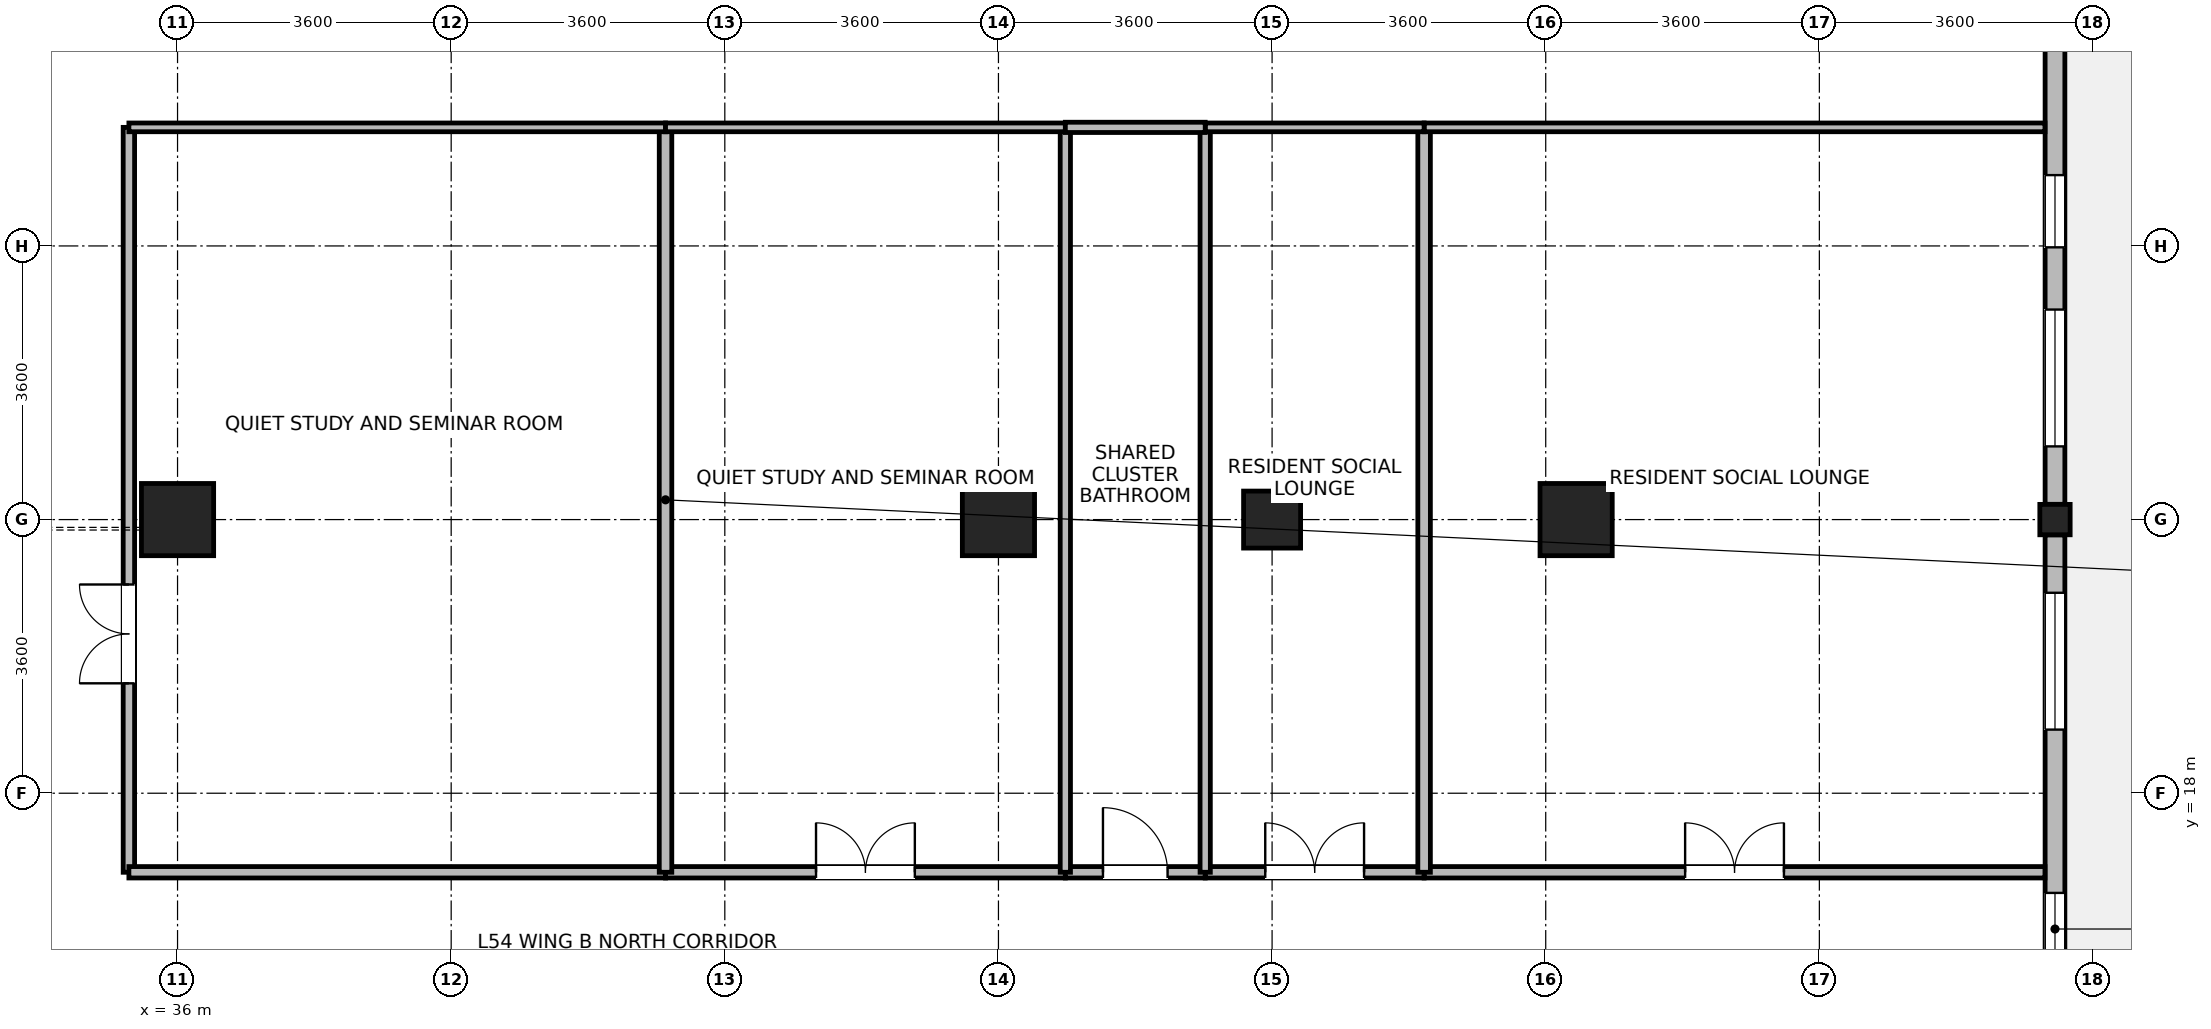
"""IFC4 building model, lengths in metres.
Left out: names, types, materials, properties, quantities, classifications, styles, units other than length and angle.
Written with IfcOpenShell. Run it as: python <this file> out.ifc"""

import sys

from ifc_helpers import new_model, si_unit, direction, frame, frame_2d, origin, origin_2d, place, context, subcontext, project, spatial, rectangle, i_section, extrude, source, transform, mapped, element, fill, save


model = new_model("IFC4")
c1 = context("Model", 3, precision=1e-05, world=origin(), true_north=direction((0.0, 1.0)))
c2 = subcontext(c1, "Body", "Model", "MODEL_VIEW")
j1 = project(units=[si_unit("LENGTHUNIT", "METRE"), si_unit("PLANEANGLEUNIT", "RADIAN")], contexts=[c1])
p1 = place(None, origin())
s1 = spatial("IfcSite", under=j1, at=p1, CompositionType="ELEMENT")
p2 = place(p1, origin())
s2 = spatial("IfcBuilding", under=s1, at=p2, CompositionType="ELEMENT")
p3 = place(p2, frame((0.0, 0.0, 212.9)))
s3 = spatial("IfcBuildingStorey", under=s2, at=p3, CompositionType="ELEMENT", Elevation=212.9)
m1 = source(origin(), c2, "Body", "SweptSolid", [
    extrude(rectangle(XDim=0.95, YDim=0.95, at=origin_2d()), origin(), (0.0, 0.0, 1.0), 3.7),
])
for number, where, z_axis, x_axis in (
    (1, (36.0, 21.6, 0.0), (0.0, 0.0, 1.0), (1.0, 0.0, 0.0)),
    (2, (46.8, 21.6, 0.0), (0.0, 0.0, 1.0), (1.0, 0.0, 0.0)),
):
    element("IfcColumn", number, at=place(p3, frame(where, z_axis=z_axis, x_axis=x_axis)), inside=s3, PredefinedType="COLUMN", context=c2, shape_type="MappedRepresentation", body=[
        mapped(m1, transform((0.0, 0.0, 0.0), x_axis=(1.0, 0.0, 0.0), y_axis=(0.0, 1.0, 0.0), z_axis=(0.0, 0.0, 1.0), scale=1.0)),
    ])
m2 = source(origin(), c2, "Body", "SweptSolid", [
    extrude(rectangle(XDim=0.75, YDim=0.75, at=origin_2d()), origin(), (0.0, 0.0, 1.0), 3.7),
])
p4 = place(p3, frame((50.4, 21.6, 0.0), z_axis=(0.0, 0.0, 1.0), x_axis=(1.0, 0.0, 0.0)))
e3 = element("IfcColumn", 3, at=p4, inside=s3, PredefinedType="PILASTER", context=c2, shape_type="MappedRepresentation", body=[
    mapped(m2, transform((0.0, 0.0, 0.0), x_axis=(1.0, 0.0, 0.0), y_axis=(0.0, 1.0, 0.0), z_axis=(0.0, 0.0, 1.0), scale=1.0)),
])
p5 = place(p3, frame((54.4, 21.6, 0.0), z_axis=(0.0, 0.0, 1.0), x_axis=(1.0, 0.0, 0.0)))
e4 = element("IfcColumn", 4, at=p5, inside=s3, PredefinedType="COLUMN", context=c2, shape_type="MappedRepresentation", body=[
    mapped(m1, transform((0.0, 0.0, 0.0), x_axis=(1.0, 0.0, 0.0), y_axis=(0.0, 1.0, 0.0), z_axis=(0.0, 0.0, 1.0), scale=1.0)),
])
m3 = source(origin(), c2, "Body", "SweptSolid", [
    extrude(i_section(OverallWidth=0.399, OverallDepth=0.4, WebThickness=0.017, FlangeThickness=0.023, FilletRadius=0.015, at=origin_2d()), origin(), (0.0, 0.0, 1.0), 3.7),
])
p6 = place(p3, frame((60.7, 21.6, 0.0), z_axis=(0.0, 0.0, 1.0), x_axis=(1.0, 0.0, 0.0)))
e5 = element("IfcColumn", 5, at=p6, inside=s3, PredefinedType="COLUMN", context=c2, shape_type="MappedRepresentation", body=[
    mapped(m3, transform((0.0, 0.0, 0.0), x_axis=(1.0, 0.0, 0.0), y_axis=(0.0, 1.0, 0.0), z_axis=(0.0, 0.0, 1.0), scale=1.0)),
])
p7 = place(p3, frame((60.7, 21.399, 0.0), z_axis=(0.0, 0.0, 1.0), x_axis=(0.0, -1.0, 0.0)))
e6 = element("IfcWall", 6, at=p7, inside=s3, PredefinedType="STANDARD", context=c2, shape_type="SweptSolid", body=[
    extrude(rectangle(XDim=6.648, YDim=0.26, at=frame_2d((3.324, 0.0))), origin(), (0.0, 0.0, 1.0), 3.05),
])
p8 = place(p7, frame((0.762, 0.0, 0.85)))
e7 = element("IfcOpeningElement", 7, at=p8, cuts=e6, PredefinedType="OPENING", context=c2, shape_type="SweptSolid", body=[
    extrude(rectangle(XDim=1.8, YDim=1.85, at=frame_2d((0.9, 0.925))), frame((0.0, 0.14, 0.0), z_axis=(0.0, -1.0, 0.0), x_axis=(1.0, 0.0, 0.0)), (0.0, 0.0, 1.0), 0.28),
])
p9 = place(p7, frame((4.71, 0.0, 0.85)))
e8 = element("IfcOpeningElement", 8, at=p9, cuts=e6, PredefinedType="OPENING", context=c2, shape_type="SweptSolid", body=[
    extrude(rectangle(XDim=0.95, YDim=1.75, at=frame_2d((0.475, 0.875))), frame((0.0, 0.14, 0.0), z_axis=(0.0, -1.0, 0.0), x_axis=(1.0, 0.0, 0.0)), (0.0, 0.0, 1.0), 0.28),
])
p10 = place(p3, frame((60.7, 28.449, 0.0), z_axis=(0.0, 0.0, 1.0), x_axis=(0.0, -1.0, 0.0)))
e9 = element("IfcWall", 9, at=p10, inside=s3, PredefinedType="STANDARD", context=c2, shape_type="SweptSolid", body=[
    extrude(rectangle(XDim=6.648, YDim=0.26, at=frame_2d((3.324, 0.0))), origin(), (0.0, 0.0, 1.0), 3.05),
])
p11 = place(p10, frame((4.086, 0.0, 0.85)))
e10 = element("IfcOpeningElement", 10, at=p11, cuts=e9, PredefinedType="OPENING", context=c2, shape_type="SweptSolid", body=[
    extrude(rectangle(XDim=1.8, YDim=1.85, at=frame_2d((0.9, 0.925))), frame((0.0, 0.14, 0.0), z_axis=(0.0, -1.0, 0.0), x_axis=(1.0, 0.0, 0.0)), (0.0, 0.0, 1.0), 0.28),
])
p12 = place(p10, frame((2.317, 0.0, 0.85)))
e11 = element("IfcOpeningElement", 11, at=p12, cuts=e9, PredefinedType="OPENING", context=c2, shape_type="SweptSolid", body=[
    extrude(rectangle(XDim=0.95, YDim=1.75, at=frame_2d((0.475, 0.875))), frame((0.0, 0.14, 0.0), z_axis=(0.0, -1.0, 0.0), x_axis=(1.0, 0.0, 0.0)), (0.0, 0.0, 1.0), 0.28),
])
p13 = place(p3, frame((35.36, 16.96, 0.0), z_axis=(0.0, 0.0, 1.0), x_axis=(0.0, 1.0, 0.0)))
e12 = element("IfcWall", 12, at=p13, inside=s3, PredefinedType="PARTITIONING", context=c2, shape_type="SweptSolid", body=[
    extrude(rectangle(XDim=9.8, YDim=0.15, at=frame_2d((4.9, 0.0))), origin(), (0.0, 0.0, 1.0), 3.45),
])
p14 = place(p13, frame((2.486, 0.0, 0.0)))
e13 = element("IfcOpeningElement", 13, at=p14, cuts=e12, PredefinedType="OPENING", context=c2, shape_type="SweptSolid", body=[
    extrude(rectangle(XDim=1.3, YDim=2.12, at=frame_2d((0.65, 1.06))), frame((0.0, 0.085, 0.0), z_axis=(0.0, -1.0, 0.0), x_axis=(1.0, 0.0, 0.0)), (0.0, 0.0, 1.0), 0.17),
])
p15 = place(p3, frame((52.4, 16.96, 0.0), z_axis=(0.0, 0.0, 1.0), x_axis=(1.0, 0.0, 0.0)))
e14 = element("IfcWall", 14, at=p15, inside=s3, PredefinedType="PARTITIONING", context=c2, shape_type="SweptSolid", body=[
    extrude(rectangle(XDim=8.168, YDim=0.15, at=frame_2d((4.084, 0.0))), origin(), (0.0, 0.0, 1.0), 3.45),
])
p16 = place(p15, frame((3.434, 0.0, 0.0)))
e15 = element("IfcOpeningElement", 15, at=p16, cuts=e14, PredefinedType="OPENING", context=c2, shape_type="SweptSolid", body=[
    extrude(rectangle(XDim=1.3, YDim=2.12, at=frame_2d((0.65, 1.06))), frame((0.0, 0.085, 0.0), z_axis=(0.0, -1.0, 0.0), x_axis=(1.0, 0.0, 0.0)), (0.0, 0.0, 1.0), 0.17),
])
p17 = place(p3, frame((35.36, 16.96, 0.0), z_axis=(0.0, 0.0, 1.0), x_axis=(1.0, 0.0, 0.0)))
e16 = element("IfcWall", 16, at=p17, inside=s3, PredefinedType="PARTITIONING", context=c2, shape_type="SweptSolid", body=[
    extrude(rectangle(XDim=7.06, YDim=0.15, at=frame_2d((3.53, 0.0))), origin(), (0.0, 0.0, 1.0), 3.45),
])
p18 = place(p3, frame((42.42, 16.96, 0.0), z_axis=(0.0, 0.0, 1.0), x_axis=(1.0, 0.0, 0.0)))
e17 = element("IfcWall", 17, at=p18, inside=s3, PredefinedType="PARTITIONING", context=c2, shape_type="SweptSolid", body=[
    extrude(rectangle(XDim=5.26, YDim=0.15, at=frame_2d((2.63, 0.0))), origin(), (0.0, 0.0, 1.0), 3.45),
])
p19 = place(p18, frame((1.98, 0.0, 0.0)))
e18 = element("IfcOpeningElement", 18, at=p19, cuts=e17, PredefinedType="OPENING", context=c2, shape_type="SweptSolid", body=[
    extrude(rectangle(XDim=1.3, YDim=2.12, at=frame_2d((0.65, 1.06))), frame((0.0, 0.085, 0.0), z_axis=(0.0, -1.0, 0.0), x_axis=(1.0, 0.0, 0.0)), (0.0, 0.0, 1.0), 0.17),
])
p20 = place(p3, frame((49.52, 16.96, 0.0), z_axis=(0.0, 0.0, 1.0), x_axis=(1.0, 0.0, 0.0)))
e19 = element("IfcWall", 19, at=p20, inside=s3, PredefinedType="PARTITIONING", context=c2, shape_type="SweptSolid", body=[
    extrude(rectangle(XDim=2.88, YDim=0.15, at=frame_2d((1.44, 0.0))), origin(), (0.0, 0.0, 1.0), 3.45),
])
p21 = place(p20, frame((0.79, 0.0, 0.0)))
e20 = element("IfcOpeningElement", 20, at=p21, cuts=e19, PredefinedType="OPENING", context=c2, shape_type="SweptSolid", body=[
    extrude(rectangle(XDim=1.3, YDim=2.12, at=frame_2d((0.65, 1.06))), frame((0.0, 0.085, 0.0), z_axis=(0.0, -1.0, 0.0), x_axis=(1.0, 0.0, 0.0)), (0.0, 0.0, 1.0), 0.17),
])
p22 = place(p3, frame((47.68, 16.96, 0.0), z_axis=(0.0, 0.0, 1.0), x_axis=(1.0, 0.0, 0.0)))
e21 = element("IfcWall", 21, at=p22, inside=s3, PredefinedType="PARTITIONING", context=c2, shape_type="SweptSolid", body=[
    extrude(rectangle(XDim=1.84, YDim=0.15, at=frame_2d((0.92, 0.0))), origin(), (0.0, 0.0, 1.0), 3.45),
])
p23 = place(p22, frame((0.495, 0.0, 0.0)))
e22 = element("IfcOpeningElement", 22, at=p23, cuts=e21, PredefinedType="OPENING", context=c2, shape_type="SweptSolid", body=[
    extrude(rectangle(XDim=0.85, YDim=2.04, at=frame_2d((0.425, 1.02))), frame((0.0, 0.085, 0.0), z_axis=(0.0, -1.0, 0.0), x_axis=(1.0, 0.0, 0.0)), (0.0, 0.0, 1.0), 0.17),
])
p24 = place(p3, frame((42.42, 16.96, 0.0), z_axis=(0.0, 0.0, 1.0), x_axis=(0.0, 1.0, 0.0)))
e23 = element("IfcWall", 23, at=p24, inside=s3, PredefinedType="PARTITIONING", context=c2, shape_type="SweptSolid", body=[
    extrude(rectangle(XDim=9.8, YDim=0.165, at=frame_2d((4.9, 0.0))), origin(), (0.0, 0.0, 1.0), 3.45),
])
for number, where, z_axis, x_axis in (
    (24, (47.68, 16.96, 0.0), (0.0, 0.0, 1.0), (0.0, 1.0, 0.0)),
    (25, (49.52, 16.96, 0.0), (0.0, 0.0, 1.0), (0.0, 1.0, 0.0)),
):
    element("IfcWall", number, at=place(p3, frame(where, z_axis=z_axis, x_axis=x_axis)), inside=s3, PredefinedType="PARTITIONING", context=c2, shape_type="SweptSolid", body=[
        extrude(rectangle(XDim=9.8, YDim=0.135, at=frame_2d((4.9, 0.0))), origin(), (0.0, 0.0, 1.0), 3.45),
    ])
p25 = place(p3, frame((52.4, 16.96, 0.0), z_axis=(0.0, 0.0, 1.0), x_axis=(0.0, 1.0, 0.0)))
e26 = element("IfcWall", 26, at=p25, inside=s3, PredefinedType="PARTITIONING", context=c2, shape_type="SweptSolid", body=[
    extrude(rectangle(XDim=9.8, YDim=0.165, at=frame_2d((4.9, 0.0))), origin(), (0.0, 0.0, 1.0), 3.45),
])
p26 = place(p3, frame((52.4, 26.76, 0.0), z_axis=(0.0, 0.0, 1.0), x_axis=(1.0, 0.0, 0.0)))
e27 = element("IfcWall", 27, at=p26, inside=s3, PredefinedType="PARTITIONING", context=c2, shape_type="SweptSolid", body=[
    extrude(rectangle(XDim=8.168, YDim=0.115, at=frame_2d((4.084, 0.0))), origin(), (0.0, 0.0, 1.0), 3.45),
])
p27 = place(p3, frame((35.36, 26.76, 0.0), z_axis=(0.0, 0.0, 1.0), x_axis=(1.0, 0.0, 0.0)))
e28 = element("IfcWall", 28, at=p27, inside=s3, PredefinedType="PARTITIONING", context=c2, shape_type="SweptSolid", body=[
    extrude(rectangle(XDim=7.06, YDim=0.115, at=frame_2d((3.53, 0.0))), origin(), (0.0, 0.0, 1.0), 3.45),
])
p28 = place(p3, frame((42.42, 26.76, 0.0), z_axis=(0.0, 0.0, 1.0), x_axis=(1.0, 0.0, 0.0)))
e29 = element("IfcWall", 29, at=p28, inside=s3, PredefinedType="PARTITIONING", context=c2, shape_type="SweptSolid", body=[
    extrude(rectangle(XDim=5.26, YDim=0.115, at=frame_2d((2.63, 0.0))), origin(), (0.0, 0.0, 1.0), 3.45),
])
p29 = place(p3, frame((49.52, 26.76, 0.0), z_axis=(0.0, 0.0, 1.0), x_axis=(1.0, 0.0, 0.0)))
e30 = element("IfcWall", 30, at=p29, inside=s3, PredefinedType="PARTITIONING", context=c2, shape_type="SweptSolid", body=[
    extrude(rectangle(XDim=2.88, YDim=0.115, at=frame_2d((1.44, 0.0))), origin(), (0.0, 0.0, 1.0), 3.45),
])
p30 = place(p3, frame((47.68, 26.76, 0.0), z_axis=(0.0, 0.0, 1.0), x_axis=(1.0, 0.0, 0.0)))
e31 = element("IfcWall", 31, at=p30, inside=s3, PredefinedType="PARTITIONING", context=c2, shape_type="SweptSolid", body=[
    extrude(rectangle(XDim=1.84, YDim=0.135, at=frame_2d((0.92, 0.0))), origin(), (0.0, 0.0, 1.0), 3.45),
])
p31 = place(p8, origin())
e32 = element("IfcWindow", 32, at=p31, inside=s3, PartitioningType="SINGLE_PANEL", PredefinedType="WINDOW", context=c2, shape_type="SweptSolid", body=[
    extrude(rectangle(XDim=1.8, YDim=1.85, at=frame_2d((0.9, 0.925))), frame((0.0, 0.03, 0.0), z_axis=(0.0, -1.0, 0.0), x_axis=(1.0, 0.0, 0.0)), (0.0, 0.0, 1.0), 0.06),
])
fill(e7, e32)
p32 = place(p9, origin())
e33 = element("IfcWindow", 33, at=p32, inside=s3, PartitioningType="SINGLE_PANEL", PredefinedType="WINDOW", context=c2, shape_type="SweptSolid", body=[
    extrude(rectangle(XDim=0.95, YDim=1.75, at=frame_2d((0.475, 0.875))), frame((0.0, 0.03, 0.0), z_axis=(0.0, -1.0, 0.0), x_axis=(1.0, 0.0, 0.0)), (0.0, 0.0, 1.0), 0.06),
])
fill(e8, e33)
p33 = place(p11, origin())
e34 = element("IfcWindow", 34, at=p33, inside=s3, PartitioningType="SINGLE_PANEL", PredefinedType="WINDOW", context=c2, shape_type="SweptSolid", body=[
    extrude(rectangle(XDim=1.8, YDim=1.85, at=frame_2d((0.9, 0.925))), frame((0.0, 0.03, 0.0), z_axis=(0.0, -1.0, 0.0), x_axis=(1.0, 0.0, 0.0)), (0.0, 0.0, 1.0), 0.06),
])
fill(e10, e34)
p34 = place(p12, origin())
e35 = element("IfcWindow", 35, at=p34, inside=s3, PartitioningType="SINGLE_PANEL", PredefinedType="WINDOW", context=c2, shape_type="SweptSolid", body=[
    extrude(rectangle(XDim=0.95, YDim=1.75, at=frame_2d((0.475, 0.875))), frame((0.0, 0.03, 0.0), z_axis=(0.0, -1.0, 0.0), x_axis=(1.0, 0.0, 0.0)), (0.0, 0.0, 1.0), 0.06),
])
fill(e11, e35)
p35 = place(p14, origin())
e36 = element("IfcDoor", 36, at=p35, inside=s3, OperationType="DOUBLE_DOOR_SINGLE_SWING", PredefinedType="DOOR", context=c2, shape_type="SweptSolid", body=[
    extrude(rectangle(XDim=1.3, YDim=2.12, at=frame_2d((0.65, 1.06))), frame((0.0, 0.025, 0.0), z_axis=(0.0, -1.0, 0.0), x_axis=(1.0, 0.0, 0.0)), (0.0, 0.0, 1.0), 0.05),
])
fill(e13, e36)
p36 = place(p16, origin())
e37 = element("IfcDoor", 37, at=p36, inside=s3, OperationType="DOUBLE_DOOR_SINGLE_SWING", PredefinedType="DOOR", context=c2, shape_type="SweptSolid", body=[
    extrude(rectangle(XDim=1.3, YDim=2.12, at=frame_2d((0.65, 1.06))), frame((0.0, 0.025, 0.0), z_axis=(0.0, -1.0, 0.0), x_axis=(1.0, 0.0, 0.0)), (0.0, 0.0, 1.0), 0.05),
])
fill(e15, e37)
p37 = place(p19, origin())
e38 = element("IfcDoor", 38, at=p37, inside=s3, OperationType="DOUBLE_DOOR_SINGLE_SWING", PredefinedType="DOOR", context=c2, shape_type="SweptSolid", body=[
    extrude(rectangle(XDim=1.3, YDim=2.12, at=frame_2d((0.65, 1.06))), frame((0.0, 0.025, 0.0), z_axis=(0.0, -1.0, 0.0), x_axis=(1.0, 0.0, 0.0)), (0.0, 0.0, 1.0), 0.05),
])
fill(e18, e38)
p38 = place(p21, origin())
e39 = element("IfcDoor", 39, at=p38, inside=s3, OperationType="DOUBLE_DOOR_SINGLE_SWING", PredefinedType="DOOR", context=c2, shape_type="SweptSolid", body=[
    extrude(rectangle(XDim=1.3, YDim=2.12, at=frame_2d((0.65, 1.06))), frame((0.0, 0.025, 0.0), z_axis=(0.0, -1.0, 0.0), x_axis=(1.0, 0.0, 0.0)), (0.0, 0.0, 1.0), 0.05),
])
fill(e20, e39)
p39 = place(p23, origin())
e40 = element("IfcDoor", 40, at=p39, inside=s3, OperationType="SINGLE_SWING_LEFT", PredefinedType="DOOR", context=c2, shape_type="SweptSolid", body=[
    extrude(rectangle(XDim=0.85, YDim=2.04, at=frame_2d((0.425, 1.02))), frame((0.0, 0.025, 0.0), z_axis=(0.0, -1.0, 0.0), x_axis=(1.0, 0.0, 0.0)), (0.0, 0.0, 1.0), 0.05),
])
fill(e22, e40)
save(model, sys.argv[1])
